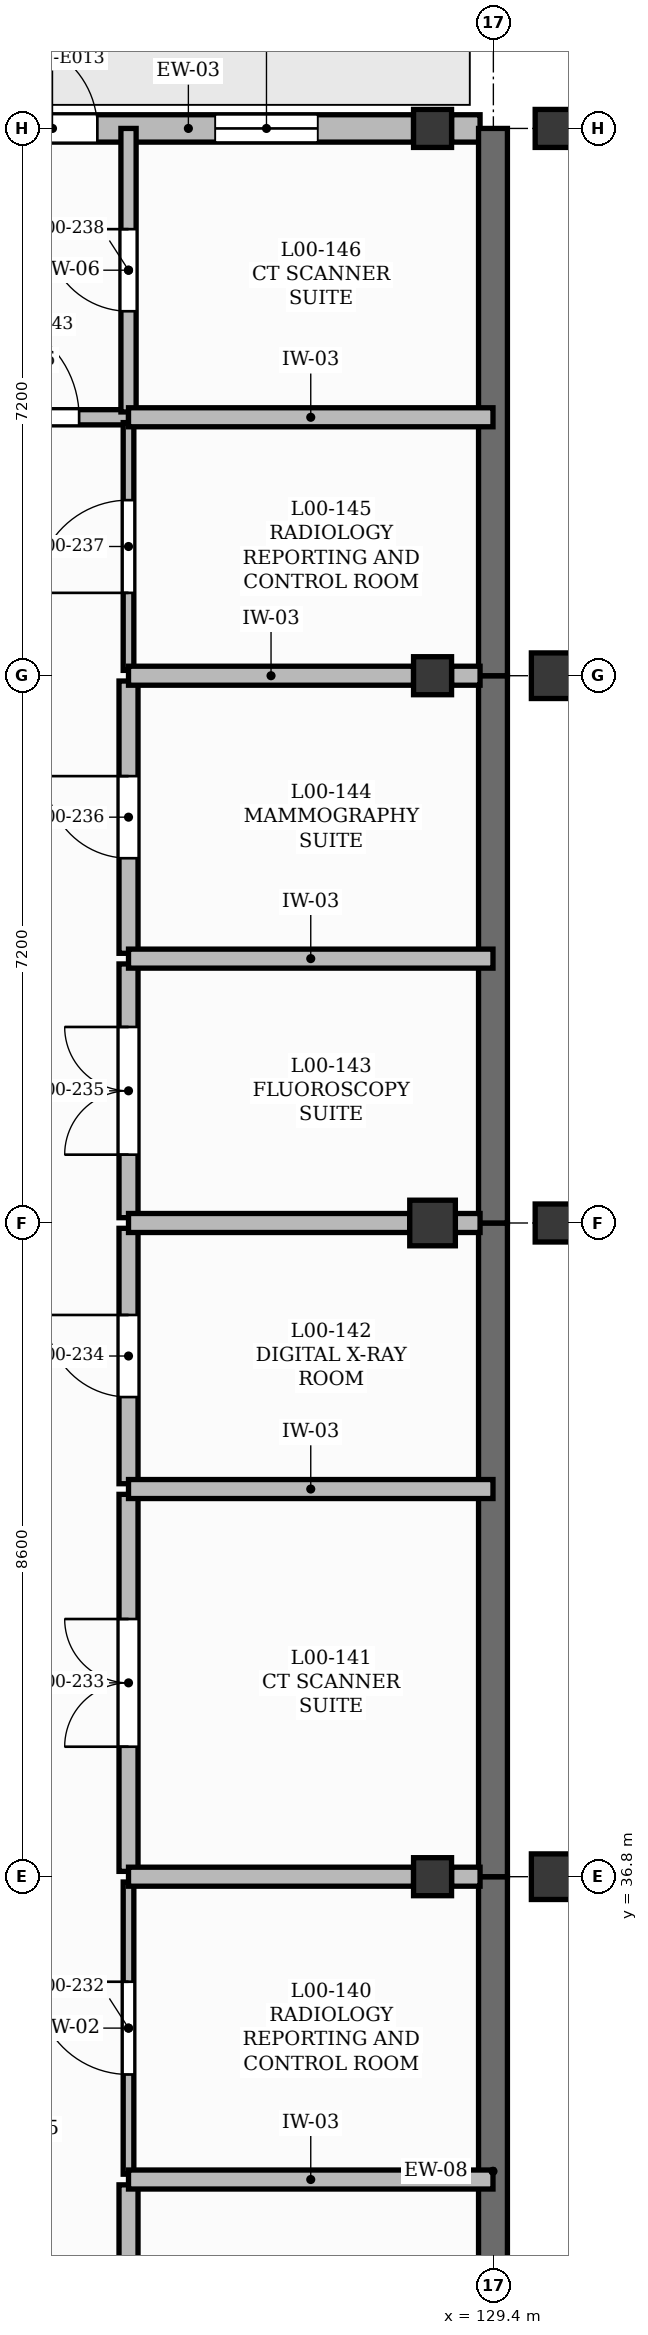
"""IFC4 building model, lengths in metres.
Left out: names, types, materials, properties, quantities, classifications, styles, units other than length and angle.
Written with IfcOpenShell. Run it as: python <this file> out.ifc"""

import sys

from ifc_helpers import new_model, si_unit, direction, frame, frame_2d, origin, origin_2d, place, context, subcontext, project, spatial, rectangle, extrude, element, fill, save


model = new_model("IFC4")
c1 = context("Model", 3, precision=1e-05, world=origin(), true_north=direction((0.0, 1.0)))
c2 = subcontext(c1, "Body", "Model", "MODEL_VIEW")
j1 = project(units=[si_unit("LENGTHUNIT", "METRE"), si_unit("PLANEANGLEUNIT", "RADIAN")], contexts=[c1])
p1 = place(None, origin())
s1 = spatial("IfcSite", under=j1, at=p1, CompositionType="ELEMENT")
p2 = place(p1, origin())
s2 = spatial("IfcBuilding", under=s1, at=p2, CompositionType="ELEMENT")
p3 = place(p2, origin())
s3 = spatial("IfcBuildingStorey", under=s2, at=p3, CompositionType="ELEMENT", Elevation=0.0)
p4 = place(p3, frame((128.6, 36.8, 0.0), z_axis=(0.0, 0.0, 1.0), x_axis=(1.0, 0.0, 0.0)))
e1 = element("IfcColumn", 1, at=p4, inside=s3, PredefinedType="COLUMN", context=c2, shape_type="SweptSolid", body=[
    extrude(rectangle(XDim=0.5, YDim=0.5, at=origin_2d()), origin(), (0.0, 0.0, 1.0), 4.2),
])
p5 = place(p3, frame((128.6, 45.4, 0.0), z_axis=(0.0, 0.0, 1.0), x_axis=(1.0, 0.0, 0.0)))
e2 = element("IfcColumn", 2, at=p5, inside=s3, PredefinedType="COLUMN", context=c2, shape_type="SweptSolid", body=[
    extrude(rectangle(XDim=0.6, YDim=0.6, at=origin_2d()), origin(), (0.0, 0.0, 1.0), 4.2),
])
for number, where, z_axis, x_axis in (
    (3, (128.6, 52.6, 0.0), (0.0, 0.0, 1.0), (1.0, 0.0, 0.0)),
    (4, (128.6, 59.8, 0.0), (0.0, 0.0, 1.0), (1.0, 0.0, 0.0)),
):
    element("IfcColumn", number, at=place(p3, frame(where, z_axis=z_axis, x_axis=x_axis)), inside=s3, PredefinedType="COLUMN", context=c2, shape_type="SweptSolid", body=[
        extrude(rectangle(XDim=0.5, YDim=0.5, at=origin_2d()), origin(), (0.0, 0.0, 1.0), 4.2),
    ])
p6 = place(p3, frame((130.2, 36.8, -0.4), z_axis=(0.0, 0.0, 1.0), x_axis=(1.0, 0.0, 0.0)))
e5 = element("IfcColumn", 5, at=p6, inside=s3, PredefinedType="COLUMN", context=c2, shape_type="SweptSolid", body=[
    extrude(rectangle(XDim=0.6, YDim=0.6, at=origin_2d()), origin(), (0.0, 0.0, 1.0), 4.5),
])
p7 = place(p3, frame((130.2, 45.4, -0.4), z_axis=(0.0, 0.0, 1.0), x_axis=(1.0, 0.0, 0.0)))
e6 = element("IfcColumn", 6, at=p7, inside=s3, PredefinedType="COLUMN", context=c2, shape_type="SweptSolid", body=[
    extrude(rectangle(XDim=0.5, YDim=0.5, at=origin_2d()), origin(), (0.0, 0.0, 1.0), 4.5),
])
p8 = place(p3, frame((130.2, 52.6, -0.4), z_axis=(0.0, 0.0, 1.0), x_axis=(1.0, 0.0, 0.0)))
e7 = element("IfcColumn", 7, at=p8, inside=s3, PredefinedType="COLUMN", context=c2, shape_type="SweptSolid", body=[
    extrude(rectangle(XDim=0.6, YDim=0.6, at=origin_2d()), origin(), (0.0, 0.0, 1.0), 4.5),
])
p9 = place(p3, frame((130.2, 59.8, -0.4), z_axis=(0.0, 0.0, 1.0), x_axis=(1.0, 0.0, 0.0)))
e8 = element("IfcColumn", 8, at=p9, inside=s3, PredefinedType="COLUMN", context=c2, shape_type="SweptSolid", body=[
    extrude(rectangle(XDim=0.5, YDim=0.5, at=origin_2d()), origin(), (0.0, 0.0, 1.0), 4.5),
])
p10 = place(p3, frame((129.395, 27.2, 0.0), z_axis=(0.0, 0.0, 1.0), x_axis=(0.0, 1.0, 0.0)))
e9 = element("IfcWall", 9, at=p10, inside=s3, PredefinedType="USERDEFINED", context=c2, shape_type="SweptSolid", body=[
    extrude(rectangle(XDim=9.6, YDim=0.38, at=frame_2d((4.8, 0.0))), origin(), (0.0, 0.0, 1.0), 4.2),
])
p11 = place(p3, frame((129.395, 36.8, 0.0), z_axis=(0.0, 0.0, 1.0), x_axis=(0.0, 1.0, 0.0)))
e10 = element("IfcWall", 10, at=p11, inside=s3, PredefinedType="USERDEFINED", context=c2, shape_type="SweptSolid", body=[
    extrude(rectangle(XDim=8.6, YDim=0.38, at=frame_2d((4.3, 0.0))), origin(), (0.0, 0.0, 1.0), 4.2),
])
p12 = place(p3, frame((129.395, 45.4, 0.0), z_axis=(0.0, 0.0, 1.0), x_axis=(0.0, 1.0, 0.0)))
e11 = element("IfcWall", 11, at=p12, inside=s3, PredefinedType="USERDEFINED", context=c2, shape_type="SweptSolid", body=[
    extrude(rectangle(XDim=7.2, YDim=0.38, at=frame_2d((3.6, 0.0))), origin(), (0.0, 0.0, 1.0), 4.2),
])
p13 = place(p3, frame((122.425, 59.8, 0.0), z_axis=(0.0, 0.0, 1.0), x_axis=(1.0, 0.0, 0.0)))
e12 = element("IfcWall", 12, at=p13, inside=s3, PredefinedType="SOLIDWALL", context=c2, shape_type="SweptSolid", body=[
    extrude(rectangle(XDim=5.925, YDim=0.36, at=frame_2d((2.962, 0.0))), origin(), (0.0, 0.0, 1.0), 3.68),
])
p14 = place(p13, frame((0.585, 0.0, 0.0)))
e13 = element("IfcOpeningElement", 13, at=p14, cuts=e12, PredefinedType="OPENING", context=c2, shape_type="SweptSolid", body=[
    extrude(rectangle(XDim=1.18, YDim=2.2, at=frame_2d((0.59, 1.1))), frame((0.0, 0.19, 0.0), z_axis=(0.0, -1.0, 0.0), x_axis=(1.0, 0.0, 0.0)), (0.0, 0.0, 1.0), 0.38),
])
p15 = place(p13, frame((3.315, 0.0, 1.0)))
e14 = element("IfcOpeningElement", 14, at=p15, cuts=e12, PredefinedType="OPENING", context=c2, shape_type="SweptSolid", body=[
    extrude(rectangle(XDim=1.35, YDim=2.2, at=frame_2d((0.675, 1.1))), frame((0.0, 0.19, 0.0), z_axis=(0.0, -1.0, 0.0), x_axis=(1.0, 0.0, 0.0)), (0.0, 0.0, 1.0), 0.38),
])
p16 = place(p3, frame((128.85, 59.8, 0.0), z_axis=(0.0, 0.0, 1.0), x_axis=(1.0, 0.0, 0.0)))
e15 = element("IfcWall", 15, at=p16, inside=s3, PredefinedType="SOLIDWALL", context=c2, shape_type="SweptSolid", body=[
    extrude(rectangle(XDim=0.375, YDim=0.36, at=frame_2d((0.188, 0.0))), origin(), (0.0, 0.0, 1.0), 4.2),
])
p17 = place(p3, frame((129.395, 52.6, 0.0), z_axis=(0.0, 0.0, 1.0), x_axis=(0.0, 1.0, 0.0)))
e16 = element("IfcWall", 16, at=p17, inside=s3, PredefinedType="USERDEFINED", context=c2, shape_type="SweptSolid", body=[
    extrude(rectangle(XDim=7.2, YDim=0.38, at=frame_2d((3.6, 0.0))), origin(), (0.0, 0.0, 1.0), 4.2),
])
p18 = place(p3, frame((121.94, 56.0, 0.0), z_axis=(0.0, 0.0, 1.0), x_axis=(1.0, 0.0, 0.0)))
e17 = element("IfcWall", 17, at=p18, inside=s3, PredefinedType="PARTITIONING", context=c2, shape_type="SweptSolid", body=[
    extrude(rectangle(XDim=2.66, YDim=0.2, at=frame_2d((1.33, 0.0))), origin(), (0.0, 0.0, 1.0), 4.18),
])
p19 = place(p18, frame((0.65, 0.0, 0.0)))
e18 = element("IfcOpeningElement", 18, at=p19, cuts=e17, PredefinedType="OPENING", context=c2, shape_type="SweptSolid", body=[
    extrude(rectangle(XDim=1.36, YDim=2.2, at=frame_2d((0.68, 1.1))), frame((0.0, 0.11, 0.0), z_axis=(0.0, -1.0, 0.0), x_axis=(1.0, 0.0, 0.0)), (0.0, 0.0, 1.0), 0.22),
])
p20 = place(p3, frame((124.6, 27.27, 0.0), z_axis=(0.0, 0.0, 1.0), x_axis=(0.0, 1.0, 0.0)))
e19 = element("IfcWall", 19, at=p20, inside=s3, PredefinedType="SOLIDWALL", context=c2, shape_type="SweptSolid", body=[
    extrude(rectangle(XDim=5.476, YDim=0.25, at=frame_2d((2.738, 0.0))), origin(), (0.0, 0.0, 1.0), 4.18),
])
p21 = place(p20, frame((1.898, 0.0, 0.0)))
e20 = element("IfcOpeningElement", 20, at=p21, cuts=e19, PredefinedType="OPENING", context=c2, shape_type="SweptSolid", body=[
    extrude(rectangle(XDim=1.68, YDim=2.3, at=frame_2d((0.84, 1.15))), frame((0.0, 0.135, 0.0), z_axis=(0.0, -1.0, 0.0), x_axis=(1.0, 0.0, 0.0)), (0.0, 0.0, 1.0), 0.27),
])
p22 = place(p3, frame((124.6, 32.886, 0.0), z_axis=(0.0, 0.0, 1.0), x_axis=(0.0, 1.0, 0.0)))
e21 = element("IfcWall", 21, at=p22, inside=s3, PredefinedType="PARTITIONING", context=c2, shape_type="SweptSolid", body=[
    extrude(rectangle(XDim=3.844, YDim=0.14, at=frame_2d((1.922, 0.0))), origin(), (0.0, 0.0, 1.0), 4.18),
])
p23 = place(p22, frame((1.312, 0.0, 0.0)))
e22 = element("IfcOpeningElement", 22, at=p23, cuts=e21, PredefinedType="OPENING", context=c2, shape_type="SweptSolid", body=[
    extrude(rectangle(XDim=1.22, YDim=2.1, at=frame_2d((0.61, 1.05))), frame((0.0, 0.08, 0.0), z_axis=(0.0, -1.0, 0.0), x_axis=(1.0, 0.0, 0.0)), (0.0, 0.0, 1.0), 0.16),
])
p24 = place(p3, frame((124.6, 32.816, 0.0), z_axis=(0.0, 0.0, 1.0), x_axis=(1.0, 0.0, 0.0)))
e23 = element("IfcWall", 23, at=p24, inside=s3, PredefinedType="SOLIDWALL", context=c2, shape_type="SweptSolid", body=[
    extrude(rectangle(XDim=4.795, YDim=0.25, at=frame_2d((2.397, 0.0))), origin(), (0.0, 0.0, 1.0), 4.18),
])
p25 = place(p3, frame((124.6, 36.87, 0.0), z_axis=(0.0, 0.0, 1.0), x_axis=(0.0, 1.0, 0.0)))
e24 = element("IfcWall", 24, at=p25, inside=s3, PredefinedType="SOLIDWALL", context=c2, shape_type="SweptSolid", body=[
    extrude(rectangle(XDim=4.96, YDim=0.25, at=frame_2d((2.48, 0.0))), origin(), (0.0, 0.0, 1.0), 4.18),
])
p26 = place(p25, frame((1.64, 0.0, 0.0)))
e25 = element("IfcOpeningElement", 25, at=p26, cuts=e24, PredefinedType="OPENING", context=c2, shape_type="SweptSolid", body=[
    extrude(rectangle(XDim=1.68, YDim=2.3, at=frame_2d((0.84, 1.15))), frame((0.0, 0.135, 0.0), z_axis=(0.0, -1.0, 0.0), x_axis=(1.0, 0.0, 0.0)), (0.0, 0.0, 1.0), 0.27),
])
p27 = place(p3, frame((124.6, 36.8, 0.0), z_axis=(0.0, 0.0, 1.0), x_axis=(1.0, 0.0, 0.0)))
e26 = element("IfcWall", 26, at=p27, inside=s3, PredefinedType="SOLIDWALL", context=c2, shape_type="SweptSolid", body=[
    extrude(rectangle(XDim=3.75, YDim=0.25, at=frame_2d((1.875, 0.0))), origin(), (0.0, 0.0, 1.0), 3.5),
])
p28 = place(p3, frame((128.85, 36.8, 0.0), z_axis=(0.0, 0.0, 1.0), x_axis=(1.0, 0.0, 0.0)))
e27 = element("IfcWall", 27, at=p28, inside=s3, PredefinedType="SOLIDWALL", context=c2, shape_type="SweptSolid", body=[
    extrude(rectangle(XDim=0.375, YDim=0.25, at=frame_2d((0.188, 0.0))), origin(), (0.0, 0.0, 1.0), 4.18),
])
p29 = place(p3, frame((124.6, 41.97, 0.0), z_axis=(0.0, 0.0, 1.0), x_axis=(0.0, 1.0, 0.0)))
e28 = element("IfcWall", 28, at=p29, inside=s3, PredefinedType="SOLIDWALL", context=c2, shape_type="SweptSolid", body=[
    extrude(rectangle(XDim=3.36, YDim=0.25, at=frame_2d((1.68, 0.0))), origin(), (0.0, 0.0, 1.0), 4.18),
])
p30 = place(p29, frame((1.14, 0.0, 0.0)))
e29 = element("IfcOpeningElement", 29, at=p30, cuts=e28, PredefinedType="OPENING", context=c2, shape_type="SweptSolid", body=[
    extrude(rectangle(XDim=1.08, YDim=2.15, at=frame_2d((0.54, 1.075))), frame((0.0, 0.135, 0.0), z_axis=(0.0, -1.0, 0.0), x_axis=(1.0, 0.0, 0.0)), (0.0, 0.0, 1.0), 0.27),
])
p31 = place(p3, frame((124.6, 41.9, 0.0), z_axis=(0.0, 0.0, 1.0), x_axis=(1.0, 0.0, 0.0)))
e30 = element("IfcWall", 30, at=p31, inside=s3, PredefinedType="SOLIDWALL", context=c2, shape_type="SweptSolid", body=[
    extrude(rectangle(XDim=4.795, YDim=0.25, at=frame_2d((2.397, 0.0))), origin(), (0.0, 0.0, 1.0), 4.18),
])
p32 = place(p3, frame((124.6, 45.47, 0.0), z_axis=(0.0, 0.0, 1.0), x_axis=(0.0, 1.0, 0.0)))
e31 = element("IfcWall", 31, at=p32, inside=s3, PredefinedType="SOLIDWALL", context=c2, shape_type="SweptSolid", body=[
    extrude(rectangle(XDim=3.338, YDim=0.25, at=frame_2d((1.669, 0.0))), origin(), (0.0, 0.0, 1.0), 4.18),
])
p33 = place(p32, frame((0.829, 0.0, 0.0)))
e32 = element("IfcOpeningElement", 32, at=p33, cuts=e31, PredefinedType="OPENING", context=c2, shape_type="SweptSolid", body=[
    extrude(rectangle(XDim=1.68, YDim=2.3, at=frame_2d((0.84, 1.15))), frame((0.0, 0.135, 0.0), z_axis=(0.0, -1.0, 0.0), x_axis=(1.0, 0.0, 0.0)), (0.0, 0.0, 1.0), 0.27),
])
p34 = place(p3, frame((124.6, 45.4, 0.0), z_axis=(0.0, 0.0, 1.0), x_axis=(1.0, 0.0, 0.0)))
e33 = element("IfcWall", 33, at=p34, inside=s3, PredefinedType="SOLIDWALL", context=c2, shape_type="SweptSolid", body=[
    extrude(rectangle(XDim=3.7, YDim=0.25, at=frame_2d((1.85, 0.0))), origin(), (0.0, 0.0, 1.0), 3.25),
])
p35 = place(p3, frame((128.9, 45.4, 0.0), z_axis=(0.0, 0.0, 1.0), x_axis=(1.0, 0.0, 0.0)))
e34 = element("IfcWall", 34, at=p35, inside=s3, PredefinedType="SOLIDWALL", context=c2, shape_type="SweptSolid", body=[
    extrude(rectangle(XDim=0.325, YDim=0.25, at=frame_2d((0.163, 0.0))), origin(), (0.0, 0.0, 1.0), 4.18),
])
p36 = place(p3, frame((124.6, 48.948, 0.0), z_axis=(0.0, 0.0, 1.0), x_axis=(0.0, 1.0, 0.0)))
e35 = element("IfcWall", 35, at=p36, inside=s3, PredefinedType="SOLIDWALL", context=c2, shape_type="SweptSolid", body=[
    extrude(rectangle(XDim=3.582, YDim=0.25, at=frame_2d((1.791, 0.0))), origin(), (0.0, 0.0, 1.0), 4.18),
])
p37 = place(p36, frame((1.251, 0.0, 0.0)))
e36 = element("IfcOpeningElement", 36, at=p37, cuts=e35, PredefinedType="OPENING", context=c2, shape_type="SweptSolid", body=[
    extrude(rectangle(XDim=1.08, YDim=2.15, at=frame_2d((0.54, 1.075))), frame((0.0, 0.135, 0.0), z_axis=(0.0, -1.0, 0.0), x_axis=(1.0, 0.0, 0.0)), (0.0, 0.0, 1.0), 0.27),
])
p38 = place(p3, frame((124.6, 48.878, 0.0), z_axis=(0.0, 0.0, 1.0), x_axis=(1.0, 0.0, 0.0)))
e37 = element("IfcWall", 37, at=p38, inside=s3, PredefinedType="SOLIDWALL", context=c2, shape_type="SweptSolid", body=[
    extrude(rectangle(XDim=4.795, YDim=0.25, at=frame_2d((2.397, 0.0))), origin(), (0.0, 0.0, 1.0), 4.18),
])
p39 = place(p3, frame((124.6, 52.67, 0.0), z_axis=(0.0, 0.0, 1.0), x_axis=(0.0, 1.0, 0.0)))
e38 = element("IfcWall", 38, at=p39, inside=s3, PredefinedType="PARTITIONING", context=c2, shape_type="SweptSolid", body=[
    extrude(rectangle(XDim=3.26, YDim=0.14, at=frame_2d((1.63, 0.0))), origin(), (0.0, 0.0, 1.0), 4.18),
])
p40 = place(p39, frame((1.02, 0.0, 0.0)))
e39 = element("IfcOpeningElement", 39, at=p40, cuts=e38, PredefinedType="OPENING", context=c2, shape_type="SweptSolid", body=[
    extrude(rectangle(XDim=1.22, YDim=2.1, at=frame_2d((0.61, 1.05))), frame((0.0, 0.08, 0.0), z_axis=(0.0, -1.0, 0.0), x_axis=(1.0, 0.0, 0.0)), (0.0, 0.0, 1.0), 0.16),
])
p41 = place(p3, frame((124.6, 52.6, 0.0), z_axis=(0.0, 0.0, 1.0), x_axis=(1.0, 0.0, 0.0)))
e40 = element("IfcWall", 40, at=p41, inside=s3, PredefinedType="SOLIDWALL", context=c2, shape_type="SweptSolid", body=[
    extrude(rectangle(XDim=3.75, YDim=0.25, at=frame_2d((1.875, 0.0))), origin(), (0.0, 0.0, 1.0), 3.5),
])
p42 = place(p3, frame((128.85, 52.6, 0.0), z_axis=(0.0, 0.0, 1.0), x_axis=(1.0, 0.0, 0.0)))
e41 = element("IfcWall", 41, at=p42, inside=s3, PredefinedType="SOLIDWALL", context=c2, shape_type="SweptSolid", body=[
    extrude(rectangle(XDim=0.375, YDim=0.25, at=frame_2d((0.188, 0.0))), origin(), (0.0, 0.0, 1.0), 4.18),
])
p43 = place(p3, frame((124.6, 56.07, 0.0), z_axis=(0.0, 0.0, 1.0), x_axis=(0.0, 1.0, 0.0)))
e42 = element("IfcWall", 42, at=p43, inside=s3, PredefinedType="PARTITIONING", context=c2, shape_type="SweptSolid", body=[
    extrude(rectangle(XDim=3.73, YDim=0.2, at=frame_2d((1.865, 0.0))), origin(), (0.0, 0.0, 1.0), 4.18),
])
p44 = place(p43, frame((1.325, 0.0, 0.0)))
e43 = element("IfcOpeningElement", 43, at=p44, cuts=e42, PredefinedType="OPENING", context=c2, shape_type="SweptSolid", body=[
    extrude(rectangle(XDim=1.08, YDim=2.15, at=frame_2d((0.54, 1.075))), frame((0.0, 0.11, 0.0), z_axis=(0.0, -1.0, 0.0), x_axis=(1.0, 0.0, 0.0)), (0.0, 0.0, 1.0), 0.22),
])
p45 = place(p3, frame((124.6, 56.0, 0.0), z_axis=(0.0, 0.0, 1.0), x_axis=(1.0, 0.0, 0.0)))
e44 = element("IfcWall", 44, at=p45, inside=s3, PredefinedType="SOLIDWALL", context=c2, shape_type="SweptSolid", body=[
    extrude(rectangle(XDim=4.795, YDim=0.25, at=frame_2d((2.397, 0.0))), origin(), (0.0, 0.0, 1.0), 4.18),
])
p46 = place(p14, origin())
e45 = element("IfcDoor", 45, at=p46, inside=s3, OperationType="SINGLE_SWING_LEFT", PredefinedType="DOOR", context=c2, shape_type="SweptSolid", body=[
    extrude(rectangle(XDim=1.18, YDim=2.2, at=frame_2d((0.59, 1.1))), frame((0.0, 0.025, 0.0), z_axis=(0.0, -1.0, 0.0), x_axis=(1.0, 0.0, 0.0)), (0.0, 0.0, 1.0), 0.05),
])
fill(e13, e45)
p47 = place(p15, origin())
e46 = element("IfcWindow", 46, at=p47, inside=s3, PartitioningType="SINGLE_PANEL", PredefinedType="WINDOW", context=c2, shape_type="SweptSolid", body=[
    extrude(rectangle(XDim=1.35, YDim=2.2, at=frame_2d((0.675, 1.1))), frame((0.0, 0.03, 0.0), z_axis=(0.0, -1.0, 0.0), x_axis=(1.0, 0.0, 0.0)), (0.0, 0.0, 1.0), 0.06),
])
fill(e14, e46)
p48 = place(p19, origin())
e47 = element("IfcDoor", 47, at=p48, inside=s3, OperationType="SINGLE_SWING_LEFT", PredefinedType="DOOR", context=c2, shape_type="SweptSolid", body=[
    extrude(rectangle(XDim=1.36, YDim=2.2, at=frame_2d((0.68, 1.1))), frame((0.0, 0.025, 0.0), z_axis=(0.0, -1.0, 0.0), x_axis=(1.0, 0.0, 0.0)), (0.0, 0.0, 1.0), 0.05),
])
fill(e18, e47)
p49 = place(p23, origin())
e48 = element("IfcDoor", 48, at=p49, inside=s3, OperationType="SINGLE_SWING_RIGHT", PredefinedType="DOOR", context=c2, shape_type="SweptSolid", body=[
    extrude(rectangle(XDim=1.22, YDim=2.1, at=frame_2d((0.61, 1.05))), frame((0.0, 0.025, 0.0), z_axis=(0.0, -1.0, 0.0), x_axis=(1.0, 0.0, 0.0)), (0.0, 0.0, 1.0), 0.05),
])
fill(e22, e48)
p50 = place(p26, origin())
e49 = element("IfcDoor", 49, at=p50, inside=s3, OperationType="DOUBLE_DOOR_SINGLE_SWING", PredefinedType="DOOR", context=c2, shape_type="SweptSolid", body=[
    extrude(rectangle(XDim=1.68, YDim=2.3, at=frame_2d((0.84, 1.15))), frame((0.0, 0.025, 0.0), z_axis=(0.0, -1.0, 0.0), x_axis=(1.0, 0.0, 0.0)), (0.0, 0.0, 1.0), 0.05),
])
fill(e25, e49)
p51 = place(p30, origin())
e50 = element("IfcDoor", 50, at=p51, inside=s3, OperationType="SINGLE_SWING_RIGHT", PredefinedType="DOOR", context=c2, shape_type="SweptSolid", body=[
    extrude(rectangle(XDim=1.08, YDim=2.15, at=frame_2d((0.54, 1.075))), frame((0.0, 0.025, 0.0), z_axis=(0.0, -1.0, 0.0), x_axis=(1.0, 0.0, 0.0)), (0.0, 0.0, 1.0), 0.05),
])
fill(e29, e50)
p52 = place(p33, origin())
e51 = element("IfcDoor", 51, at=p52, inside=s3, OperationType="DOUBLE_DOOR_SINGLE_SWING", PredefinedType="DOOR", context=c2, shape_type="SweptSolid", body=[
    extrude(rectangle(XDim=1.68, YDim=2.3, at=frame_2d((0.84, 1.15))), frame((0.0, 0.025, 0.0), z_axis=(0.0, -1.0, 0.0), x_axis=(1.0, 0.0, 0.0)), (0.0, 0.0, 1.0), 0.05),
])
fill(e32, e51)
p53 = place(p37, origin())
e52 = element("IfcDoor", 52, at=p53, inside=s3, OperationType="SINGLE_SWING_RIGHT", PredefinedType="DOOR", context=c2, shape_type="SweptSolid", body=[
    extrude(rectangle(XDim=1.08, YDim=2.15, at=frame_2d((0.54, 1.075))), frame((0.0, 0.025, 0.0), z_axis=(0.0, -1.0, 0.0), x_axis=(1.0, 0.0, 0.0)), (0.0, 0.0, 1.0), 0.05),
])
fill(e36, e52)
p54 = place(p40, origin())
e53 = element("IfcDoor", 53, at=p54, inside=s3, OperationType="SINGLE_SWING_LEFT", PredefinedType="DOOR", context=c2, shape_type="SweptSolid", body=[
    extrude(rectangle(XDim=1.22, YDim=2.1, at=frame_2d((0.61, 1.05))), frame((0.0, 0.025, 0.0), z_axis=(0.0, -1.0, 0.0), x_axis=(1.0, 0.0, 0.0)), (0.0, 0.0, 1.0), 0.05),
])
fill(e39, e53)
p55 = place(p44, origin())
e54 = element("IfcDoor", 54, at=p55, inside=s3, OperationType="SINGLE_SWING_RIGHT", PredefinedType="DOOR", context=c2, shape_type="SweptSolid", body=[
    extrude(rectangle(XDim=1.08, YDim=2.15, at=frame_2d((0.54, 1.075))), frame((0.0, 0.025, 0.0), z_axis=(0.0, -1.0, 0.0), x_axis=(1.0, 0.0, 0.0)), (0.0, 0.0, 1.0), 0.05),
])
fill(e43, e54)
save(model, sys.argv[1])
